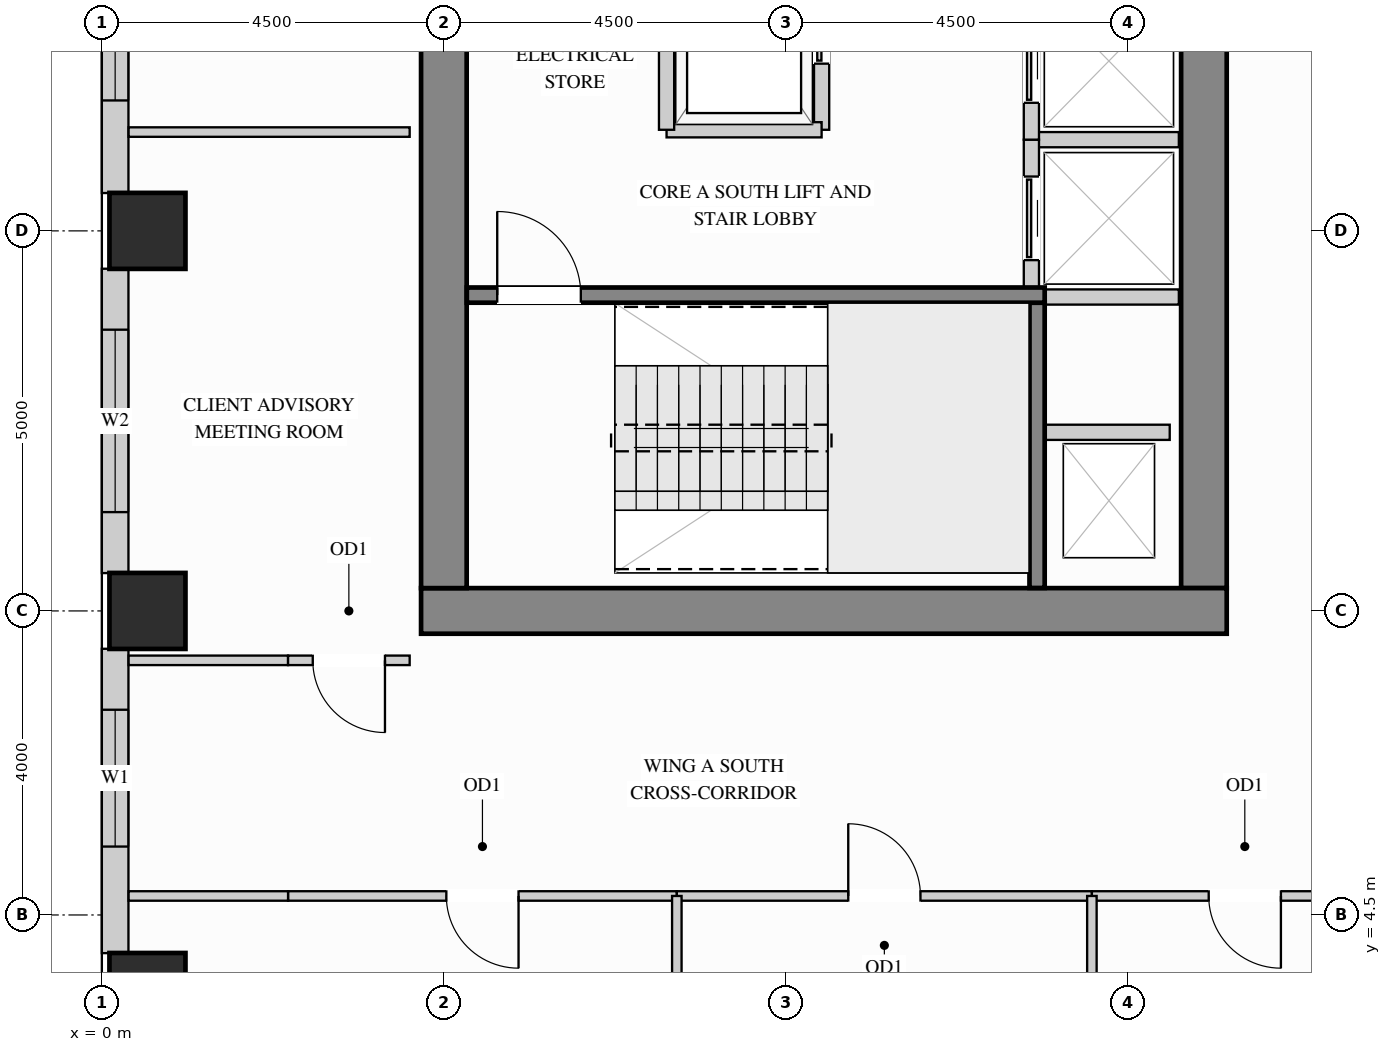
"""IFC4 building model, lengths in metres.
Left out: names, types, materials, properties, quantities, classifications, styles, units other than length and angle.
Written with IfcOpenShell. Run it as: python <this file> out.ifc"""

import sys

from ifc_helpers import new_model, si_unit, direction, frame, frame_2d, origin, origin_2d, place, context, subcontext, project, spatial, rectangle, extrude, source, transform, mapped, element, fill, save


model = new_model("IFC4")
c1 = context("Model", 3, precision=1e-05, world=origin(), true_north=direction((0.0, 1.0)))
c2 = subcontext(c1, "Body", "Model", "MODEL_VIEW")
j1 = project(units=[si_unit("LENGTHUNIT", "METRE"), si_unit("PLANEANGLEUNIT", "RADIAN")], contexts=[c1])
p1 = place(None, origin())
s1 = spatial("IfcSite", under=j1, at=p1, CompositionType="ELEMENT")
p2 = place(p1, origin())
s2 = spatial("IfcBuilding", under=s1, at=p2, CompositionType="ELEMENT")
p3 = place(p2, frame((0.0, 0.0, 164.7)))
s3 = spatial("IfcBuildingStorey", under=s2, at=p3, CompositionType="ELEMENT", Elevation=164.7)
m1 = source(origin(), c2, "Body", "SweptSolid", [
    extrude(rectangle(XDim=1.0, YDim=1.0, at=origin_2d()), origin(), (0.0, 0.0, 1.0), 3.4),
])
for number, where, z_axis, x_axis in (
    (1, (0.6, 13.5, 0.0), (0.0, 0.0, 1.0), (1.0, 0.0, 0.0)),
    (2, (0.6, 3.5, 0.0), (0.0, 0.0, 1.0), (1.0, 0.0, 0.0)),
    (3, (0.6, 8.5, 0.0), (0.0, 0.0, 1.0), (1.0, 0.0, 0.0)),
):
    element("IfcColumn", number, at=place(p3, frame(where, z_axis=z_axis, x_axis=x_axis)), inside=s3, PredefinedType="COLUMN", context=c2, shape_type="MappedRepresentation", body=[
        mapped(m1, transform((0.0, 0.0, 0.0), x_axis=(1.0, 0.0, 0.0), y_axis=(0.0, 1.0, 0.0), z_axis=(0.0, 0.0, 1.0))),
    ])
m2 = source(origin(), c2, "Body", "SweptSolid", [
    extrude(rectangle(XDim=10.02, YDim=0.6, at=frame_2d((5.01, 0.0))), origin(), (0.0, 0.0, 1.0), 3.4),
])
p4 = place(p3, frame((14.5, 8.8, 0.0), z_axis=(0.0, 0.0, 1.0), x_axis=(0.0, 1.0, 0.0)))
e4 = element("IfcWall", 4, at=p4, inside=s3, PredefinedType="SHEAR", context=c2, shape_type="MappedRepresentation", body=[
    mapped(m2, transform((0.0, 0.0, 0.0), x_axis=(1.0, 0.0, 0.0), y_axis=(0.0, 1.0, 0.0), z_axis=(0.0, 0.0, 1.0))),
])
m3 = source(origin(), c2, "Body", "SweptSolid", [
    extrude(rectangle(XDim=10.6, YDim=0.6, at=frame_2d((5.3, 0.0))), origin(), (0.0, 0.0, 1.0), 3.4),
])
p5 = place(p3, frame((4.2, 8.5, 0.0), z_axis=(0.0, 0.0, 1.0), x_axis=(1.0, 0.0, 0.0)))
e5 = element("IfcWall", 5, at=p5, inside=s3, PredefinedType="SHEAR", context=c2, shape_type="MappedRepresentation", body=[
    mapped(m3, transform((0.0, 0.0, 0.0), x_axis=(1.0, 0.0, 0.0), y_axis=(0.0, 1.0, 0.0), z_axis=(0.0, 0.0, 1.0))),
])
m4 = source(origin(), c2, "Body", "SweptSolid", [
    extrude(rectangle(XDim=20.4, YDim=0.6, at=frame_2d((10.2, 0.0))), origin(), (0.0, 0.0, 1.0), 3.4),
])
p6 = place(p3, frame((4.5, 8.8, 0.0), z_axis=(0.0, 0.0, 1.0), x_axis=(0.0, 1.0, 0.0)))
e6 = element("IfcWall", 6, at=p6, inside=s3, PredefinedType="SHEAR", context=c2, shape_type="MappedRepresentation", body=[
    mapped(m4, transform((0.0, 0.0, 0.0), x_axis=(1.0, 0.0, 0.0), y_axis=(0.0, 1.0, 0.0), z_axis=(0.0, 0.0, 1.0))),
])
p7 = place(p3, frame((0.175, 17.502, 0.0), z_axis=(0.0, 0.0, 1.0), x_axis=(0.0, -1.0, 0.0)))
e7 = element("IfcWall", 7, at=p7, inside=s3, PredefinedType="SOLIDWALL", context=c2, shape_type="SweptSolid", body=[
    extrude(rectangle(XDim=3.504, YDim=0.35, at=frame_2d((1.752, 0.0))), origin(), (0.0, 0.0, 1.0), 2.612),
])
p8 = place(p7, frame((0.486, 0.0, 0.78)))
e8 = element("IfcOpeningElement", 8, at=p8, cuts=e7, PredefinedType="OPENING", context=c2, shape_type="SweptSolid", body=[
    extrude(rectangle(XDim=1.8, YDim=1.652, at=frame_2d((0.9, 0.826))), frame((0.0, 0.185, 0.0), z_axis=(0.0, -1.0, 0.0), x_axis=(1.0, 0.0, 0.0)), (0.0, 0.0, 1.0), 0.37),
])
p9 = place(p3, frame((0.175, 13.002, 0.0), z_axis=(0.0, 0.0, 1.0), x_axis=(0.0, -1.0, 0.0)))
e9 = element("IfcWall", 9, at=p9, inside=s3, PredefinedType="SOLIDWALL", context=c2, shape_type="SweptSolid", body=[
    extrude(rectangle(XDim=4.004, YDim=0.35, at=frame_2d((2.002, 0.0))), origin(), (0.0, 0.0, 1.0), 2.612),
])
p10 = place(p9, frame((0.802, 0.0, 0.78)))
e10 = element("IfcOpeningElement", 10, at=p10, cuts=e9, PredefinedType="OPENING", context=c2, shape_type="SweptSolid", body=[
    extrude(rectangle(XDim=2.4, YDim=1.652, at=frame_2d((1.2, 0.826))), frame((0.0, 0.185, 0.0), z_axis=(0.0, -1.0, 0.0), x_axis=(1.0, 0.0, 0.0)), (0.0, 0.0, 1.0), 0.37),
])
p11 = place(p3, frame((0.175, 8.002, 0.0), z_axis=(0.0, 0.0, 1.0), x_axis=(0.0, -1.0, 0.0)))
e11 = element("IfcWall", 11, at=p11, inside=s3, PredefinedType="SOLIDWALL", context=c2, shape_type="SweptSolid", body=[
    extrude(rectangle(XDim=4.004, YDim=0.35, at=frame_2d((2.002, 0.0))), origin(), (0.0, 0.0, 1.0), 2.612),
])
p12 = place(p11, frame((0.802, 0.0, 0.78)))
e12 = element("IfcOpeningElement", 12, at=p12, cuts=e11, PredefinedType="OPENING", context=c2, shape_type="SweptSolid", body=[
    extrude(rectangle(XDim=1.8, YDim=1.652, at=frame_2d((0.9, 0.826))), frame((0.0, 0.185, 0.0), z_axis=(0.0, -1.0, 0.0), x_axis=(1.0, 0.0, 0.0)), (0.0, 0.0, 1.0), 0.37),
])
m5 = source(origin(), c2, "Body", "SweptSolid", [
    extrude(rectangle(XDim=2.098, YDim=0.125, at=frame_2d((1.049, 0.0))), origin(), (0.0, 0.0, 1.0), 3.385),
])
p13 = place(p3, frame((0.352, 7.85, 0.0), z_axis=(0.0, 0.0, 1.0), x_axis=(1.0, 0.0, 0.0)))
e13 = element("IfcWall", 13, at=p13, inside=s3, PredefinedType="PARTITIONING", context=c2, shape_type="MappedRepresentation", body=[
    mapped(m5, transform((0.0, 0.0, 0.0), x_axis=(1.0, 0.0, 0.0), y_axis=(0.0, 1.0, 0.0), z_axis=(0.0, 0.0, 1.0))),
])
p14 = place(p3, frame((2.45, 7.85, 0.0), z_axis=(0.0, 0.0, 1.0), x_axis=(1.0, 0.0, 0.0)))
e14 = element("IfcWall", 14, at=p14, inside=s3, PredefinedType="PARTITIONING", context=c2, shape_type="SweptSolid", body=[
    extrude(rectangle(XDim=1.6, YDim=0.125, at=frame_2d((0.8, 0.0))), origin(), (0.0, 0.0, 1.0), 3.385),
])
p15 = place(p14, frame((0.325, 0.0, 0.0)))
e15 = element("IfcOpeningElement", 15, at=p15, cuts=e14, PredefinedType="OPENING", context=c2, shape_type="SweptSolid", body=[
    extrude(rectangle(XDim=0.95, YDim=2.15, at=frame_2d((0.475, 1.075))), frame((0.0, 0.073, 0.0), z_axis=(0.0, -1.0, 0.0), x_axis=(1.0, 0.0, 0.0)), (0.0, 0.0, 1.0), 0.145),
])
p16 = place(p3, frame((2.45, 4.75, 0.0), z_axis=(0.0, 0.0, 1.0), x_axis=(1.0, 0.0, 0.0)))
e16 = element("IfcWall", 16, at=p16, inside=s3, PredefinedType="PARTITIONING", context=c2, shape_type="SweptSolid", body=[
    extrude(rectangle(XDim=5.115, YDim=0.125, at=frame_2d((2.558, 0.0))), origin(), (0.0, 0.0, 1.0), 2.848),
])
p17 = place(p16, frame((2.083, 0.0, 0.0)))
e17 = element("IfcOpeningElement", 17, at=p17, cuts=e16, PredefinedType="OPENING", context=c2, shape_type="SweptSolid", body=[
    extrude(rectangle(XDim=0.95, YDim=2.15, at=frame_2d((0.475, 1.075))), frame((0.0, 0.073, 0.0), z_axis=(0.0, -1.0, 0.0), x_axis=(1.0, 0.0, 0.0)), (0.0, 0.0, 1.0), 0.145),
])
p18 = place(p3, frame((7.565, 4.75, 0.0), z_axis=(0.0, 0.0, 1.0), x_axis=(1.0, 0.0, 0.0)))
e18 = element("IfcWall", 18, at=p18, inside=s3, PredefinedType="PARTITIONING", context=c2, shape_type="SweptSolid", body=[
    extrude(rectangle(XDim=5.461, YDim=0.125, at=frame_2d((2.73, 0.0))), origin(), (0.0, 0.0, 1.0), 2.848),
])
p19 = place(p18, frame((2.256, 0.0, 0.0)))
e19 = element("IfcOpeningElement", 19, at=p19, cuts=e18, PredefinedType="OPENING", context=c2, shape_type="SweptSolid", body=[
    extrude(rectangle(XDim=0.95, YDim=2.15, at=frame_2d((0.475, 1.075))), frame((0.0, 0.073, 0.0), z_axis=(0.0, -1.0, 0.0), x_axis=(1.0, 0.0, 0.0)), (0.0, 0.0, 1.0), 0.145),
])
p20 = place(p3, frame((13.026, 4.75, 0.0), z_axis=(0.0, 0.0, 1.0), x_axis=(1.0, 0.0, 0.0)))
e20 = element("IfcWall", 20, at=p20, inside=s3, PredefinedType="PARTITIONING", context=c2, shape_type="SweptSolid", body=[
    extrude(rectangle(XDim=4.024, YDim=0.125, at=frame_2d((2.012, 0.0))), origin(), (0.0, 0.0, 1.0), 2.848),
])
p21 = place(p20, frame((1.537, 0.0, 0.0)))
e21 = element("IfcOpeningElement", 21, at=p21, cuts=e20, PredefinedType="OPENING", context=c2, shape_type="SweptSolid", body=[
    extrude(rectangle(XDim=0.95, YDim=2.15, at=frame_2d((0.475, 1.075))), frame((0.0, 0.073, 0.0), z_axis=(0.0, -1.0, 0.0), x_axis=(1.0, 0.0, 0.0)), (0.0, 0.0, 1.0), 0.145),
])
m6 = source(origin(), c2, "Body", "SweptSolid", [
    extrude(rectangle(XDim=2.098, YDim=0.125, at=frame_2d((1.049, 0.0))), origin(), (0.0, 0.0, 1.0), 2.848),
])
p22 = place(p3, frame((0.352, 4.75, 0.0), z_axis=(0.0, 0.0, 1.0), x_axis=(1.0, 0.0, 0.0)))
e22 = element("IfcWall", 22, at=p22, inside=s3, PredefinedType="PARTITIONING", context=c2, shape_type="MappedRepresentation", body=[
    mapped(m6, transform((0.0, 0.0, 0.0), x_axis=(1.0, 0.0, 0.0), y_axis=(0.0, 1.0, 0.0), z_axis=(0.0, 0.0, 1.0))),
])
m7 = source(origin(), c2, "Body", "SweptSolid", [
    extrude(rectangle(XDim=4.398, YDim=0.125, at=frame_2d((2.199, 0.0))), origin(), (0.0, 0.0, 1.0), 3.385),
])
for number, where, z_axis, x_axis in (
    (23, (7.565, 0.352, 0.0), (0.0, 0.0, 1.0), (0.0, 1.0, 0.0)),
    (24, (13.026, 0.352, 0.0), (0.0, 0.0, 1.0), (0.0, 1.0, 0.0)),
):
    element("IfcWall", number, at=place(p3, frame(where, z_axis=z_axis, x_axis=x_axis)), inside=s3, PredefinedType="PARTITIONING", context=c2, shape_type="MappedRepresentation", body=[
        mapped(m7, transform((0.0, 0.0, 0.0), x_axis=(1.0, 0.0, 0.0), y_axis=(0.0, 1.0, 0.0), z_axis=(0.0, 0.0, 1.0))),
    ])
m8 = source(origin(), c2, "Body", "SweptSolid", [
    extrude(rectangle(XDim=3.698, YDim=0.125, at=frame_2d((1.849, 0.0))), origin(), (0.0, 0.0, 1.0), 3.385),
])
p23 = place(p3, frame((0.352, 14.8, 0.0), z_axis=(0.0, 0.0, 1.0), x_axis=(1.0, 0.0, 0.0)))
e25 = element("IfcWall", 25, at=p23, inside=s3, PredefinedType="PARTITIONING", context=c2, shape_type="MappedRepresentation", body=[
    mapped(m8, transform((0.0, 0.0, 0.0), x_axis=(1.0, 0.0, 0.0), y_axis=(0.0, 1.0, 0.0), z_axis=(0.0, 0.0, 1.0))),
])
m9 = source(origin(), c2, "Body", "SweptSolid", [
    extrude(rectangle(XDim=1.63, YDim=0.2, at=frame_2d((0.815, 0.0))), origin(), (0.0, 0.0, 1.0), 3.385),
])
p24 = place(p3, frame((12.42, 10.85, 0.0), z_axis=(0.0, 0.0, 1.0), x_axis=(1.0, 0.0, 0.0)))
e26 = element("IfcWall", 26, at=p24, inside=s3, PredefinedType="PARTITIONING", context=c2, shape_type="MappedRepresentation", body=[
    mapped(m9, transform((0.0, 0.0, 0.0), x_axis=(1.0, 0.0, 0.0), y_axis=(0.0, 1.0, 0.0), z_axis=(0.0, 0.0, 1.0))),
])
m10 = source(origin(), c2, "Body", "SweptSolid", [
    extrude(rectangle(XDim=1.94, YDim=0.2, at=frame_2d((0.97, 0.0))), origin(), (0.0, 0.0, 1.0), 3.385),
])
for number, where, z_axis, x_axis in (
    (27, (12.23, 14.7, 0.0), (0.0, 0.0, 1.0), (1.0, 0.0, 0.0)),
    (28, (12.23, 12.63, 0.0), (0.0, 0.0, 1.0), (1.0, 0.0, 0.0)),
):
    element("IfcWall", number, at=place(p3, frame(where, z_axis=z_axis, x_axis=x_axis)), inside=s3, PredefinedType="PARTITIONING", context=c2, shape_type="MappedRepresentation", body=[
        mapped(m10, transform((0.0, 0.0, 0.0), x_axis=(1.0, 0.0, 0.0), y_axis=(0.0, 1.0, 0.0), z_axis=(0.0, 0.0, 1.0))),
    ])
p25 = place(p3, frame((12.23, 12.63, 0.0), z_axis=(0.0, 0.0, 1.0), x_axis=(0.0, 1.0, 0.0)))
e29 = element("IfcWall", 29, at=p25, inside=s3, PredefinedType="PARTITIONING", context=c2, shape_type="SweptSolid", body=[
    extrude(rectangle(XDim=2.07, YDim=0.2, at=frame_2d((1.035, 0.0))), origin(), (0.0, 0.0, 1.0), 3.385),
])
p26 = place(p25, frame((0.485, 0.0, 0.0)))
e30 = element("IfcOpeningElement", 30, at=p26, cuts=e29, PredefinedType="OPENING", context=c2, shape_type="SweptSolid", body=[
    extrude(rectangle(XDim=1.1, YDim=2.2, at=frame_2d((0.55, 1.1))), frame((0.0, 0.11, 0.0), z_axis=(0.0, -1.0, 0.0), x_axis=(1.0, 0.0, 0.0)), (0.0, 0.0, 1.0), 0.22),
])
p27 = place(p3, frame((12.23, 14.7, 0.0), z_axis=(0.0, 0.0, 1.0), x_axis=(0.0, 1.0, 0.0)))
e31 = element("IfcWall", 31, at=p27, inside=s3, PredefinedType="PARTITIONING", context=c2, shape_type="SweptSolid", body=[
    extrude(rectangle(XDim=2.07, YDim=0.2, at=frame_2d((1.035, 0.0))), origin(), (0.0, 0.0, 1.0), 3.385),
])
p28 = place(p27, frame((0.485, 0.0, 0.0)))
e32 = element("IfcOpeningElement", 32, at=p28, cuts=e31, PredefinedType="OPENING", context=c2, shape_type="SweptSolid", body=[
    extrude(rectangle(XDim=1.1, YDim=2.2, at=frame_2d((0.55, 1.1))), frame((0.0, 0.11, 0.0), z_axis=(0.0, -1.0, 0.0), x_axis=(1.0, 0.0, 0.0)), (0.0, 0.0, 1.0), 0.22),
])
p29 = place(p3, frame((9.47, 14.83, 0.0), z_axis=(0.0, 0.0, 1.0), x_axis=(0.0, 1.0, 0.0)))
e33 = element("IfcWall", 33, at=p29, inside=s3, PredefinedType="PARTITIONING", context=c2, shape_type="SweptSolid", body=[
    extrude(rectangle(XDim=2.84, YDim=0.2, at=frame_2d((1.42, 0.0))), origin(), (0.0, 0.0, 1.0), 3.385),
])
p30 = place(p29, frame((0.87, 0.0, 0.0)))
e34 = element("IfcOpeningElement", 34, at=p30, cuts=e33, PredefinedType="OPENING", context=c2, shape_type="SweptSolid", body=[
    extrude(rectangle(XDim=1.1, YDim=2.2, at=frame_2d((0.55, 1.1))), frame((0.0, 0.11, 0.0), z_axis=(0.0, -1.0, 0.0), x_axis=(1.0, 0.0, 0.0)), (0.0, 0.0, 1.0), 0.22),
])
m11 = source(origin(), c2, "Body", "SweptSolid", [
    extrude(rectangle(XDim=2.04, YDim=0.2, at=frame_2d((1.02, 0.0))), origin(), (0.0, 0.0, 1.0), 3.385),
])
p31 = place(p3, frame((7.43, 14.83, 0.0), z_axis=(0.0, 0.0, 1.0), x_axis=(1.0, 0.0, 0.0)))
e35 = element("IfcWall", 35, at=p31, inside=s3, PredefinedType="PARTITIONING", context=c2, shape_type="MappedRepresentation", body=[
    mapped(m11, transform((0.0, 0.0, 0.0), x_axis=(1.0, 0.0, 0.0), y_axis=(0.0, 1.0, 0.0), z_axis=(0.0, 0.0, 1.0))),
])
m12 = source(origin(), c2, "Body", "SweptSolid", [
    extrude(rectangle(XDim=2.84, YDim=0.2, at=frame_2d((1.42, 0.0))), origin(), (0.0, 0.0, 1.0), 3.385),
])
p32 = place(p3, frame((7.43, 14.83, 0.0), z_axis=(0.0, 0.0, 1.0), x_axis=(0.0, 1.0, 0.0)))
e36 = element("IfcWall", 36, at=p32, inside=s3, PredefinedType="PARTITIONING", context=c2, shape_type="MappedRepresentation", body=[
    mapped(m12, transform((0.0, 0.0, 0.0), x_axis=(1.0, 0.0, 0.0), y_axis=(0.0, 1.0, 0.0), z_axis=(0.0, 0.0, 1.0))),
])
m13 = source(origin(), c2, "Body", "SweptSolid", [
    extrude(rectangle(XDim=3.753, YDim=0.2, at=frame_2d((1.876, 0.0))), origin(), (0.0, 0.0, 1.0), 3.4),
])
p33 = place(p3, frame((12.305, 8.802, 0.0), z_axis=(0.0, 0.0, 1.0), x_axis=(0.0, 1.0, 0.0)))
e37 = element("IfcWall", 37, at=p33, inside=s3, PredefinedType="SHEAR", context=c2, shape_type="MappedRepresentation", body=[
    mapped(m13, transform((0.0, 0.0, 0.0), x_axis=(1.0, 0.0, 0.0), y_axis=(0.0, 1.0, 0.0), z_axis=(0.0, 0.0, 1.0))),
])
p34 = place(p3, frame((4.802, 12.655, 0.0), z_axis=(0.0, 0.0, 1.0), x_axis=(1.0, 0.0, 0.0)))
e38 = element("IfcWall", 38, at=p34, inside=s3, PredefinedType="SHEAR", context=c2, shape_type="SweptSolid", body=[
    extrude(rectangle(XDim=7.603, YDim=0.2, at=frame_2d((3.802, 0.0))), origin(), (0.0, 0.0, 1.0), 3.4),
])
p35 = place(p34, frame((0.4, 0.0, 0.0)))
e39 = element("IfcOpeningElement", 39, at=p35, cuts=e38, PredefinedType="OPENING", context=c2, shape_type="SweptSolid", body=[
    extrude(rectangle(XDim=1.1, YDim=2.15, at=frame_2d((0.55, 1.075))), frame((0.0, 0.11, 0.0), z_axis=(0.0, -1.0, 0.0), x_axis=(1.0, 0.0, 0.0)), (0.0, 0.0, 1.0), 0.22),
])
m14 = source(origin(), c2, "Body", "SweptSolid", [
    extrude(rectangle(XDim=1.1, YDim=2.2, at=frame_2d((0.55, 1.1))), frame((0.0, 0.025, 0.0), z_axis=(0.0, -1.0, 0.0), x_axis=(1.0, 0.0, 0.0)), (0.0, 0.0, 1.0), 0.05),
])
p36 = place(p26, origin())
e40 = element("IfcDoor", 40, at=p36, inside=s3, OperationType="SLIDING_TO_LEFT", PredefinedType="DOOR", context=c2, shape_type="MappedRepresentation", body=[
    mapped(m14, transform((0.0, 0.0, 0.0), x_axis=(1.0, 0.0, 0.0), y_axis=(0.0, 1.0, 0.0), z_axis=(0.0, 0.0, 1.0))),
])
fill(e30, e40)
p37 = place(p28, origin())
e41 = element("IfcDoor", 41, at=p37, inside=s3, OperationType="SLIDING_TO_LEFT", PredefinedType="DOOR", context=c2, shape_type="MappedRepresentation", body=[
    mapped(m14, transform((0.0, 0.0, 0.0), x_axis=(1.0, 0.0, 0.0), y_axis=(0.0, 1.0, 0.0), z_axis=(0.0, 0.0, 1.0))),
])
fill(e32, e41)
p38 = place(p30, origin())
e42 = element("IfcDoor", 42, at=p38, inside=s3, OperationType="SLIDING_TO_LEFT", PredefinedType="DOOR", context=c2, shape_type="MappedRepresentation", body=[
    mapped(m14, transform((0.0, 0.0, 0.0), x_axis=(1.0, 0.0, 0.0), y_axis=(0.0, 1.0, 0.0), z_axis=(0.0, 0.0, 1.0))),
])
fill(e34, e42)
m15 = source(origin(), c2, "Body", "SweptSolid", [
    extrude(rectangle(XDim=0.95, YDim=2.15, at=frame_2d((0.475, 1.075))), frame((0.0, 0.025, 0.0), z_axis=(0.0, -1.0, 0.0), x_axis=(1.0, 0.0, 0.0)), (0.0, 0.0, 1.0), 0.05),
])
p39 = place(p17, origin())
e43 = element("IfcDoor", 43, at=p39, inside=s3, OperationType="SINGLE_SWING_RIGHT", PredefinedType="DOOR", context=c2, shape_type="MappedRepresentation", body=[
    mapped(m15, transform((0.0, 0.0, 0.0), x_axis=(1.0, 0.0, 0.0), y_axis=(0.0, 1.0, 0.0), z_axis=(0.0, 0.0, 1.0))),
])
fill(e17, e43)
p40 = place(p19, origin())
e44 = element("IfcDoor", 44, at=p40, inside=s3, OperationType="SINGLE_SWING_LEFT", PredefinedType="DOOR", context=c2, shape_type="MappedRepresentation", body=[
    mapped(m15, transform((0.0, 0.0, 0.0), x_axis=(1.0, 0.0, 0.0), y_axis=(0.0, 1.0, 0.0), z_axis=(0.0, 0.0, 1.0))),
])
fill(e19, e44)
p41 = place(p21, origin())
e45 = element("IfcDoor", 45, at=p41, inside=s3, OperationType="SINGLE_SWING_RIGHT", PredefinedType="DOOR", context=c2, shape_type="MappedRepresentation", body=[
    mapped(m15, transform((0.0, 0.0, 0.0), x_axis=(1.0, 0.0, 0.0), y_axis=(0.0, 1.0, 0.0), z_axis=(0.0, 0.0, 1.0))),
])
fill(e21, e45)
p42 = place(p15, origin())
e46 = element("IfcDoor", 46, at=p42, inside=s3, OperationType="SINGLE_SWING_RIGHT", PredefinedType="DOOR", context=c2, shape_type="MappedRepresentation", body=[
    mapped(m15, transform((0.0, 0.0, 0.0), x_axis=(1.0, 0.0, 0.0), y_axis=(0.0, 1.0, 0.0), z_axis=(0.0, 0.0, 1.0))),
])
fill(e15, e46)
m16 = source(origin(), c2, "Body", "SweptSolid", [
    extrude(rectangle(XDim=1.1, YDim=2.15, at=frame_2d((0.55, 1.075))), frame((0.0, 0.025, 0.0), z_axis=(0.0, -1.0, 0.0), x_axis=(1.0, 0.0, 0.0)), (0.0, 0.0, 1.0), 0.05),
])
p43 = place(p35, origin())
e47 = element("IfcDoor", 47, at=p43, inside=s3, OperationType="SINGLE_SWING_LEFT", PredefinedType="DOOR", context=c2, shape_type="MappedRepresentation", body=[
    mapped(m16, transform((0.0, 0.0, 0.0), x_axis=(1.0, 0.0, 0.0), y_axis=(0.0, 1.0, 0.0), z_axis=(0.0, 0.0, 1.0))),
])
fill(e39, e47)
m17 = source(origin(), c2, "Body", "SweptSolid", [
    extrude(rectangle(XDim=1.8, YDim=1.652, at=frame_2d((0.9, 0.826))), frame((0.0, 0.03, 0.0), z_axis=(0.0, -1.0, 0.0), x_axis=(1.0, 0.0, 0.0)), (0.0, 0.0, 1.0), 0.06),
])
p44 = place(p8, origin())
e48 = element("IfcWindow", 48, at=p44, inside=s3, PartitioningType="SINGLE_PANEL", PredefinedType="WINDOW", context=c2, shape_type="MappedRepresentation", body=[
    mapped(m17, transform((0.0, 0.0, 0.0), x_axis=(1.0, 0.0, 0.0), y_axis=(0.0, 1.0, 0.0), z_axis=(0.0, 0.0, 1.0))),
])
fill(e8, e48)
p45 = place(p12, origin())
e49 = element("IfcWindow", 49, at=p45, inside=s3, PartitioningType="SINGLE_PANEL", PredefinedType="WINDOW", context=c2, shape_type="MappedRepresentation", body=[
    mapped(m17, transform((0.0, 0.0, 0.0), x_axis=(1.0, 0.0, 0.0), y_axis=(0.0, 1.0, 0.0), z_axis=(0.0, 0.0, 1.0))),
])
fill(e12, e49)
m18 = source(origin(), c2, "Body", "SweptSolid", [
    extrude(rectangle(XDim=2.4, YDim=1.652, at=frame_2d((1.2, 0.826))), frame((0.0, 0.03, 0.0), z_axis=(0.0, -1.0, 0.0), x_axis=(1.0, 0.0, 0.0)), (0.0, 0.0, 1.0), 0.06),
])
p46 = place(p10, origin())
e50 = element("IfcWindow", 50, at=p46, inside=s3, PartitioningType="SINGLE_PANEL", PredefinedType="WINDOW", context=c2, shape_type="MappedRepresentation", body=[
    mapped(m18, transform((0.0, 0.0, 0.0), x_axis=(1.0, 0.0, 0.0), y_axis=(0.0, 1.0, 0.0), z_axis=(0.0, 0.0, 1.0))),
])
fill(e10, e50)
save(model, sys.argv[1])
